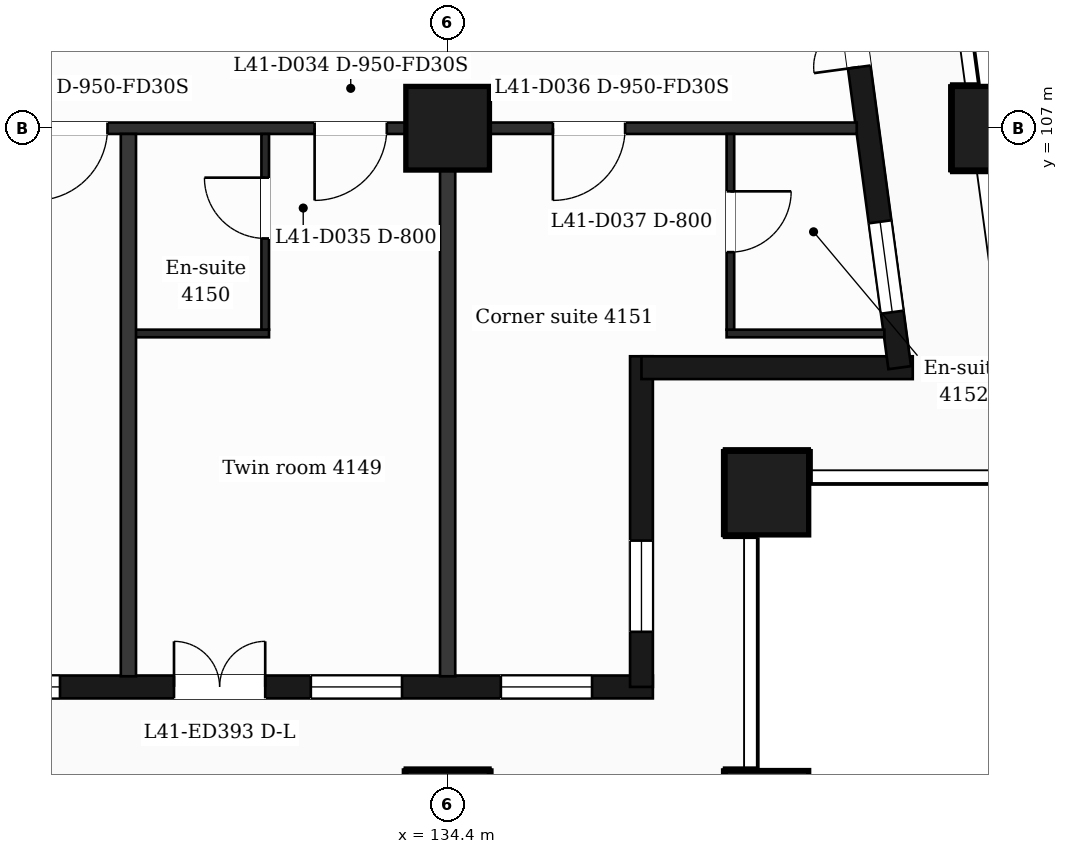
"""IFC4 building model, lengths in metres.
Left out: names, types, materials, properties, quantities, classifications, styles, units other than length and angle.
Written with IfcOpenShell. Run it as: python <this file> out.ifc"""

import sys

from ifc_helpers import new_model, si_unit, direction, frame, frame_2d, origin, origin_2d, place, context, subcontext, project, spatial, rectangle, extrude, element, fill, save


model = new_model("IFC4")
c1 = context("Model", 3, precision=1e-05, world=origin(), true_north=direction((0.0, 1.0)))
c2 = subcontext(c1, "Body", "Model", "MODEL_VIEW")
j1 = project(units=[si_unit("LENGTHUNIT", "METRE"), si_unit("PLANEANGLEUNIT", "RADIAN")], contexts=[c1])
p1 = place(None, origin())
s1 = spatial("IfcSite", under=j1, at=p1, CompositionType="ELEMENT")
p2 = place(p1, origin())
s2 = spatial("IfcBuilding", under=s1, at=p2, CompositionType="ELEMENT")
p3 = place(p2, frame((0.0, 0.0, 173.7)))
s3 = spatial("IfcBuildingStorey", under=s2, at=p3, CompositionType="ELEMENT", Elevation=173.7)
for number, where, z_axis, x_axis in (
    (1, (134.4, 98.0, 0.0), (0.0, 0.0, 1.0), (1.0, 0.0, 0.0)),
    (2, (138.6, 98.0, 0.0), (0.0, 0.0, 1.0), (1.0, 0.0, 0.0)),
    (3, (138.6, 102.2, 0.0), (0.0, 0.0, 1.0), (1.0, 0.0, 0.0)),
    (4, (134.4, 107.0, 0.0), (0.0, 0.0, 1.0), (1.0, 0.0, 0.0)),
    (5, (141.588, 107.0, 0.0), (0.0, 0.0, 1.0), (1.0, 0.0, 0.0)),
):
    element("IfcColumn", number, at=place(p3, frame(where, z_axis=z_axis, x_axis=x_axis)), inside=s3, PredefinedType="COLUMN", context=c2, shape_type="SweptSolid", body=[
        extrude(rectangle(XDim=1.1, YDim=1.1, at=origin_2d()), origin(), (0.0, 0.0, 1.0), 3.7),
    ])
p4 = place(p3, frame((89.85, 99.65, 0.0), z_axis=(0.0, 0.0, 1.0), x_axis=(1.0, 0.0, 0.0)))
e6 = element("IfcWall", 6, at=p4, inside=s3, PredefinedType="SOLIDWALL", context=c2, shape_type="SweptSolid", body=[
    extrude(rectangle(XDim=47.25, YDim=0.3, at=frame_2d((23.625, 0.0))), origin(), (0.0, 0.0, 1.0), 3.38),
])
p5 = place(p4, frame((0.725, 0.0, 0.9)))
e7 = element("IfcOpeningElement", 7, at=p5, cuts=e6, PredefinedType="OPENING", context=c2, shape_type="SweptSolid", body=[
    extrude(rectangle(XDim=1.2, YDim=2.1, at=frame_2d((0.6, 1.05))), frame((0.0, 0.16, 0.0), z_axis=(0.0, -1.0, 0.0), x_axis=(1.0, 0.0, 0.0)), (0.0, 0.0, 1.0), 0.32),
])
p6 = place(p4, frame((3.45, 0.0, 0.9)))
e8 = element("IfcOpeningElement", 8, at=p6, cuts=e6, PredefinedType="OPENING", context=c2, shape_type="SweptSolid", body=[
    extrude(rectangle(XDim=2.4, YDim=2.1, at=frame_2d((1.2, 1.05))), frame((0.0, 0.16, 0.0), z_axis=(0.0, -1.0, 0.0), x_axis=(1.0, 0.0, 0.0)), (0.0, 0.0, 1.0), 0.32),
])
p7 = place(p4, frame((7.65, 0.0, 0.9)))
e9 = element("IfcOpeningElement", 9, at=p7, cuts=e6, PredefinedType="OPENING", context=c2, shape_type="SweptSolid", body=[
    extrude(rectangle(XDim=2.4, YDim=2.1, at=frame_2d((1.2, 1.05))), frame((0.0, 0.16, 0.0), z_axis=(0.0, -1.0, 0.0), x_axis=(1.0, 0.0, 0.0)), (0.0, 0.0, 1.0), 0.32),
])
p8 = place(p4, frame((11.85, 0.0, 0.9)))
e10 = element("IfcOpeningElement", 10, at=p8, cuts=e6, PredefinedType="OPENING", context=c2, shape_type="SweptSolid", body=[
    extrude(rectangle(XDim=2.4, YDim=2.1, at=frame_2d((1.2, 1.05))), frame((0.0, 0.16, 0.0), z_axis=(0.0, -1.0, 0.0), x_axis=(1.0, 0.0, 0.0)), (0.0, 0.0, 1.0), 0.32),
])
p9 = place(p4, frame((16.05, 0.0, 0.9)))
e11 = element("IfcOpeningElement", 11, at=p9, cuts=e6, PredefinedType="OPENING", context=c2, shape_type="SweptSolid", body=[
    extrude(rectangle(XDim=2.4, YDim=2.1, at=frame_2d((1.2, 1.05))), frame((0.0, 0.16, 0.0), z_axis=(0.0, -1.0, 0.0), x_axis=(1.0, 0.0, 0.0)), (0.0, 0.0, 1.0), 0.32),
])
p10 = place(p4, frame((20.25, 0.0, 0.9)))
e12 = element("IfcOpeningElement", 12, at=p10, cuts=e6, PredefinedType="OPENING", context=c2, shape_type="SweptSolid", body=[
    extrude(rectangle(XDim=2.4, YDim=2.1, at=frame_2d((1.2, 1.05))), frame((0.0, 0.16, 0.0), z_axis=(0.0, -1.0, 0.0), x_axis=(1.0, 0.0, 0.0)), (0.0, 0.0, 1.0), 0.32),
])
p11 = place(p4, frame((25.05, 0.0, 0.9)))
e13 = element("IfcOpeningElement", 13, at=p11, cuts=e6, PredefinedType="OPENING", context=c2, shape_type="SweptSolid", body=[
    extrude(rectangle(XDim=1.2, YDim=2.1, at=frame_2d((0.6, 1.05))), frame((0.0, 0.16, 0.0), z_axis=(0.0, -1.0, 0.0), x_axis=(1.0, 0.0, 0.0)), (0.0, 0.0, 1.0), 0.32),
])
p12 = place(p4, frame((29.25, 0.0, 0.9)))
e14 = element("IfcOpeningElement", 14, at=p12, cuts=e6, PredefinedType="OPENING", context=c2, shape_type="SweptSolid", body=[
    extrude(rectangle(XDim=1.2, YDim=2.1, at=frame_2d((0.6, 1.05))), frame((0.0, 0.16, 0.0), z_axis=(0.0, -1.0, 0.0), x_axis=(1.0, 0.0, 0.0)), (0.0, 0.0, 1.0), 0.32),
])
p13 = place(p4, frame((32.55, 0.0, 0.0)))
e15 = element("IfcOpeningElement", 15, at=p13, cuts=e6, PredefinedType="OPENING", context=c2, shape_type="SweptSolid", body=[
    extrude(rectangle(XDim=1.2, YDim=2.4, at=frame_2d((0.6, 1.2))), frame((0.0, 0.16, 0.0), z_axis=(0.0, -1.0, 0.0), x_axis=(1.0, 0.0, 0.0)), (0.0, 0.0, 1.0), 0.32),
])
p14 = place(p4, frame((34.35, 0.0, 0.9)))
e16 = element("IfcOpeningElement", 16, at=p14, cuts=e6, PredefinedType="OPENING", context=c2, shape_type="SweptSolid", body=[
    extrude(rectangle(XDim=1.2, YDim=2.1, at=frame_2d((0.6, 1.05))), frame((0.0, 0.16, 0.0), z_axis=(0.0, -1.0, 0.0), x_axis=(1.0, 0.0, 0.0)), (0.0, 0.0, 1.0), 0.32),
])
p15 = place(p4, frame((37.05, 0.0, 0.9)))
e17 = element("IfcOpeningElement", 17, at=p15, cuts=e6, PredefinedType="OPENING", context=c2, shape_type="SweptSolid", body=[
    extrude(rectangle(XDim=2.4, YDim=2.1, at=frame_2d((1.2, 1.05))), frame((0.0, 0.16, 0.0), z_axis=(0.0, -1.0, 0.0), x_axis=(1.0, 0.0, 0.0)), (0.0, 0.0, 1.0), 0.32),
])
p16 = place(p4, frame((40.95, 0.0, 0.0)))
e18 = element("IfcOpeningElement", 18, at=p16, cuts=e6, PredefinedType="OPENING", context=c2, shape_type="SweptSolid", body=[
    extrude(rectangle(XDim=1.2, YDim=2.4, at=frame_2d((0.6, 1.2))), frame((0.0, 0.16, 0.0), z_axis=(0.0, -1.0, 0.0), x_axis=(1.0, 0.0, 0.0)), (0.0, 0.0, 1.0), 0.32),
])
p17 = place(p4, frame((42.75, 0.0, 0.9)))
e19 = element("IfcOpeningElement", 19, at=p17, cuts=e6, PredefinedType="OPENING", context=c2, shape_type="SweptSolid", body=[
    extrude(rectangle(XDim=1.2, YDim=2.1, at=frame_2d((0.6, 1.05))), frame((0.0, 0.16, 0.0), z_axis=(0.0, -1.0, 0.0), x_axis=(1.0, 0.0, 0.0)), (0.0, 0.0, 1.0), 0.32),
])
p18 = place(p4, frame((45.25, 0.0, 0.9)))
e20 = element("IfcOpeningElement", 20, at=p18, cuts=e6, PredefinedType="OPENING", context=c2, shape_type="SweptSolid", body=[
    extrude(rectangle(XDim=1.2, YDim=2.1, at=frame_2d((0.6, 1.05))), frame((0.0, 0.16, 0.0), z_axis=(0.0, -1.0, 0.0), x_axis=(1.0, 0.0, 0.0)), (0.0, 0.0, 1.0), 0.32),
])
p19 = place(p3, frame((136.95, 99.65, 0.0), z_axis=(0.0, 0.0, 1.0), x_axis=(0.0, 1.0, 0.0)))
e21 = element("IfcWall", 21, at=p19, inside=s3, PredefinedType="SOLIDWALL", context=c2, shape_type="SweptSolid", body=[
    extrude(rectangle(XDim=4.35, YDim=0.3, at=frame_2d((2.175, 0.0))), origin(), (0.0, 0.0, 1.0), 3.38),
])
p20 = place(p19, frame((0.725, 0.0, 0.9)))
e22 = element("IfcOpeningElement", 22, at=p20, cuts=e21, PredefinedType="OPENING", context=c2, shape_type="SweptSolid", body=[
    extrude(rectangle(XDim=1.2, YDim=2.1, at=frame_2d((0.6, 1.05))), frame((0.0, 0.16, 0.0), z_axis=(0.0, -1.0, 0.0), x_axis=(1.0, 0.0, 0.0)), (0.0, 0.0, 1.0), 0.32),
])
p21 = place(p3, frame((136.95, 103.85, 0.0), z_axis=(0.0, 0.0, 1.0), x_axis=(1.0, 0.0, 0.0)))
e23 = element("IfcWall", 23, at=p21, inside=s3, PredefinedType="SOLIDWALL", context=c2, shape_type="SweptSolid", body=[
    extrude(rectangle(XDim=3.569, YDim=0.3, at=frame_2d((1.785, 0.0))), origin(), (0.0, 0.0, 1.0), 3.38),
])
p22 = place(p3, frame((140.348, 103.85, 0.0), z_axis=(0.0, 0.0, 1.0), x_axis=(-0.133431549479, 0.991058031401, 0.0)))
e24 = element("IfcWall", 24, at=p22, inside=s3, PredefinedType="SOLIDWALL", context=c2, shape_type="SweptSolid", body=[
    extrude(rectangle(XDim=6.609, YDim=0.3, at=frame_2d((3.304, 0.0))), origin(), (0.0, 0.0, 1.0), 3.38),
])
p23 = place(p22, frame((0.737, 0.0, 0.9)))
e25 = element("IfcOpeningElement", 25, at=p23, cuts=e24, PredefinedType="OPENING", context=c2, shape_type="SweptSolid", body=[
    extrude(rectangle(XDim=1.2, YDim=2.1, at=frame_2d((0.6, 1.05))), frame((0.0, 0.16, 0.0), z_axis=(0.0, -1.0, 0.0), x_axis=(1.0, 0.0, 0.0)), (0.0, 0.0, 1.0), 0.32),
])
p24 = place(p22, frame((3.991, 0.0, 0.0)))
e26 = element("IfcOpeningElement", 26, at=p24, cuts=e24, PredefinedType="OPENING", context=c2, shape_type="SweptSolid", body=[
    extrude(rectangle(XDim=1.2, YDim=2.4, at=frame_2d((0.6, 1.2))), frame((0.0, 0.16, 0.0), z_axis=(0.0, -1.0, 0.0), x_axis=(1.0, 0.0, 0.0)), (0.0, 0.0, 1.0), 0.32),
])
p25 = place(p3, frame((130.2, 104.3, 0.0), z_axis=(0.0, 0.0, 1.0), x_axis=(1.0, 0.0, 0.0)))
e27 = element("IfcWall", 27, at=p25, inside=s3, PredefinedType="PARTITIONING", context=c2, shape_type="SweptSolid", body=[
    extrude(rectangle(XDim=1.85, YDim=0.1, at=frame_2d((0.925, 0.0))), origin(), (0.0, 0.0, 1.0), 3.38),
])
p26 = place(p3, frame((138.07, 104.3, 0.0), z_axis=(0.0, 0.0, 1.0), x_axis=(1.0, 0.0, 0.0)))
e28 = element("IfcWall", 28, at=p26, inside=s3, PredefinedType="PARTITIONING", context=c2, shape_type="SweptSolid", body=[
    extrude(rectangle(XDim=2.076, YDim=0.1, at=frame_2d((1.038, 0.0))), origin(), (0.0, 0.0, 1.0), 3.38),
])
p27 = place(p3, frame((87.018, 107.0, 0.0), z_axis=(0.0, 0.0, 1.0), x_axis=(1.0, 0.0, 0.0)))
e29 = element("IfcWall", 29, at=p27, inside=s3, PredefinedType="PARTITIONING", context=c2, shape_type="SweptSolid", body=[
    extrude(rectangle(XDim=52.765, YDim=0.15, at=frame_2d((26.382, 0.0))), origin(), (0.0, 0.0, 1.0), 3.38),
])
p28 = place(p27, frame((1.276, 0.0, 0.0)))
e30 = element("IfcOpeningElement", 30, at=p28, cuts=e29, PredefinedType="OPENING", context=c2, shape_type="SweptSolid", body=[
    extrude(rectangle(XDim=0.95, YDim=2.1, at=frame_2d((0.475, 1.05))), frame((0.0, 0.085, 0.0), z_axis=(0.0, -1.0, 0.0), x_axis=(1.0, 0.0, 0.0)), (0.0, 0.0, 1.0), 0.17),
])
p29 = place(p27, frame((8.357, 0.0, 0.0)))
e31 = element("IfcOpeningElement", 31, at=p29, cuts=e29, PredefinedType="OPENING", context=c2, shape_type="SweptSolid", body=[
    extrude(rectangle(XDim=0.95, YDim=2.1, at=frame_2d((0.475, 1.05))), frame((0.0, 0.085, 0.0), z_axis=(0.0, -1.0, 0.0), x_axis=(1.0, 0.0, 0.0)), (0.0, 0.0, 1.0), 0.17),
])
p30 = place(p27, frame((9.832, 0.0, 0.0)))
e32 = element("IfcOpeningElement", 32, at=p30, cuts=e29, PredefinedType="OPENING", context=c2, shape_type="SweptSolid", body=[
    extrude(rectangle(XDim=1.0, YDim=2.1, at=frame_2d((0.5, 1.05))), frame((0.0, 0.085, 0.0), z_axis=(0.0, -1.0, 0.0), x_axis=(1.0, 0.0, 0.0)), (0.0, 0.0, 1.0), 0.17),
])
p31 = place(p27, frame((14.547, 0.0, 0.0)))
e33 = element("IfcOpeningElement", 33, at=p31, cuts=e29, PredefinedType="OPENING", context=c2, shape_type="SweptSolid", body=[
    extrude(rectangle(XDim=0.95, YDim=2.1, at=frame_2d((0.475, 1.05))), frame((0.0, 0.085, 0.0), z_axis=(0.0, -1.0, 0.0), x_axis=(1.0, 0.0, 0.0)), (0.0, 0.0, 1.0), 0.17),
])
p32 = place(p27, frame((18.257, 0.0, 0.0)))
e34 = element("IfcOpeningElement", 34, at=p32, cuts=e29, PredefinedType="OPENING", context=c2, shape_type="SweptSolid", body=[
    extrude(rectangle(XDim=0.95, YDim=2.1, at=frame_2d((0.475, 1.05))), frame((0.0, 0.085, 0.0), z_axis=(0.0, -1.0, 0.0), x_axis=(1.0, 0.0, 0.0)), (0.0, 0.0, 1.0), 0.17),
])
p33 = place(p27, frame((25.212, 0.0, 0.0)))
e35 = element("IfcOpeningElement", 35, at=p33, cuts=e29, PredefinedType="OPENING", context=c2, shape_type="SweptSolid", body=[
    extrude(rectangle(XDim=1.0, YDim=2.1, at=frame_2d((0.5, 1.05))), frame((0.0, 0.085, 0.0), z_axis=(0.0, -1.0, 0.0), x_axis=(1.0, 0.0, 0.0)), (0.0, 0.0, 1.0), 0.17),
])
p34 = place(p27, frame((37.267, 0.0, 0.0)))
e36 = element("IfcOpeningElement", 36, at=p34, cuts=e29, PredefinedType="OPENING", context=c2, shape_type="SweptSolid", body=[
    extrude(rectangle(XDim=0.95, YDim=2.1, at=frame_2d((0.475, 1.05))), frame((0.0, 0.085, 0.0), z_axis=(0.0, -1.0, 0.0), x_axis=(1.0, 0.0, 0.0)), (0.0, 0.0, 1.0), 0.17),
])
p35 = place(p27, frame((41.957, 0.0, 0.0)))
e37 = element("IfcOpeningElement", 37, at=p35, cuts=e29, PredefinedType="OPENING", context=c2, shape_type="SweptSolid", body=[
    extrude(rectangle(XDim=0.95, YDim=2.1, at=frame_2d((0.475, 1.05))), frame((0.0, 0.085, 0.0), z_axis=(0.0, -1.0, 0.0), x_axis=(1.0, 0.0, 0.0)), (0.0, 0.0, 1.0), 0.17),
])
p36 = place(p27, frame((45.632, 0.0, 0.0)))
e38 = element("IfcOpeningElement", 38, at=p36, cuts=e29, PredefinedType="OPENING", context=c2, shape_type="SweptSolid", body=[
    extrude(rectangle(XDim=0.95, YDim=2.1, at=frame_2d((0.475, 1.05))), frame((0.0, 0.085, 0.0), z_axis=(0.0, -1.0, 0.0), x_axis=(1.0, 0.0, 0.0)), (0.0, 0.0, 1.0), 0.17),
])
p37 = place(p27, frame((48.767, 0.0, 0.0)))
e39 = element("IfcOpeningElement", 39, at=p37, cuts=e29, PredefinedType="OPENING", context=c2, shape_type="SweptSolid", body=[
    extrude(rectangle(XDim=0.95, YDim=2.1, at=frame_2d((0.475, 1.05))), frame((0.0, 0.085, 0.0), z_axis=(0.0, -1.0, 0.0), x_axis=(1.0, 0.0, 0.0)), (0.0, 0.0, 1.0), 0.17),
])
p38 = place(p3, frame((130.2, 99.79, 0.0), z_axis=(0.0, 0.0, 1.0), x_axis=(0.0, 1.0, 0.0)))
e40 = element("IfcWall", 40, at=p38, inside=s3, PredefinedType="PARTITIONING", context=c2, shape_type="SweptSolid", body=[
    extrude(rectangle(XDim=7.135, YDim=0.2, at=frame_2d((3.567, 0.0))), origin(), (0.0, 0.0, 1.0), 3.38),
])
p39 = place(p3, frame((132.0, 104.35, 0.0), z_axis=(0.0, 0.0, 1.0), x_axis=(0.0, 1.0, 0.0)))
e41 = element("IfcWall", 41, at=p39, inside=s3, PredefinedType="PARTITIONING", context=c2, shape_type="SweptSolid", body=[
    extrude(rectangle(XDim=2.575, YDim=0.1, at=frame_2d((1.288, 0.0))), origin(), (0.0, 0.0, 1.0), 3.38),
])
p40 = place(p39, frame((1.2, 0.0, 0.0)))
e42 = element("IfcOpeningElement", 42, at=p40, cuts=e41, PredefinedType="OPENING", context=c2, shape_type="SweptSolid", body=[
    extrude(rectangle(XDim=0.8, YDim=2.1, at=frame_2d((0.4, 1.05))), frame((0.0, 0.06, 0.0), z_axis=(0.0, -1.0, 0.0), x_axis=(1.0, 0.0, 0.0)), (0.0, 0.0, 1.0), 0.12),
])
p41 = place(p3, frame((134.4, 99.79, 0.0), z_axis=(0.0, 0.0, 1.0), x_axis=(0.0, 1.0, 0.0)))
e43 = element("IfcWall", 43, at=p41, inside=s3, PredefinedType="PARTITIONING", context=c2, shape_type="SweptSolid", body=[
    extrude(rectangle(XDim=7.135, YDim=0.2, at=frame_2d((3.567, 0.0))), origin(), (0.0, 0.0, 1.0), 3.38),
])
p42 = place(p3, frame((138.12, 104.35, 0.0), z_axis=(0.0, 0.0, 1.0), x_axis=(0.0, 1.0, 0.0)))
e44 = element("IfcWall", 44, at=p42, inside=s3, PredefinedType="PARTITIONING", context=c2, shape_type="SweptSolid", body=[
    extrude(rectangle(XDim=2.575, YDim=0.1, at=frame_2d((1.288, 0.0))), origin(), (0.0, 0.0, 1.0), 3.38),
])
p43 = place(p42, frame((1.02, 0.0, 0.0)))
e45 = element("IfcOpeningElement", 45, at=p43, cuts=e44, PredefinedType="OPENING", context=c2, shape_type="SweptSolid", body=[
    extrude(rectangle(XDim=0.8, YDim=2.1, at=frame_2d((0.4, 1.05))), frame((0.0, 0.06, 0.0), z_axis=(0.0, -1.0, 0.0), x_axis=(1.0, 0.0, 0.0)), (0.0, 0.0, 1.0), 0.12),
])
p44 = place(p15, origin())
e46 = element("IfcWindow", 46, at=p44, inside=s3, PartitioningType="SINGLE_PANEL", PredefinedType="WINDOW", context=c2, shape_type="SweptSolid", body=[
    extrude(rectangle(XDim=2.4, YDim=2.1, at=frame_2d((1.2, 1.05))), frame((0.0, 0.03, 0.0), z_axis=(0.0, -1.0, 0.0), x_axis=(1.0, 0.0, 0.0)), (0.0, 0.0, 1.0), 0.06),
])
fill(e17, e46)
p45 = place(p16, origin())
e47 = element("IfcDoor", 47, at=p45, inside=s3, OperationType="DOUBLE_DOOR_SINGLE_SWING", PredefinedType="DOOR", context=c2, shape_type="SweptSolid", body=[
    extrude(rectangle(XDim=1.2, YDim=2.4, at=frame_2d((0.6, 1.2))), frame((0.0, 0.025, 0.0), z_axis=(0.0, -1.0, 0.0), x_axis=(1.0, 0.0, 0.0)), (0.0, 0.0, 1.0), 0.05),
])
fill(e18, e47)
p46 = place(p17, origin())
e48 = element("IfcWindow", 48, at=p46, inside=s3, PartitioningType="SINGLE_PANEL", PredefinedType="WINDOW", context=c2, shape_type="SweptSolid", body=[
    extrude(rectangle(XDim=1.2, YDim=2.1, at=frame_2d((0.6, 1.05))), frame((0.0, 0.03, 0.0), z_axis=(0.0, -1.0, 0.0), x_axis=(1.0, 0.0, 0.0)), (0.0, 0.0, 1.0), 0.06),
])
fill(e19, e48)
p47 = place(p18, origin())
e49 = element("IfcWindow", 49, at=p47, inside=s3, PartitioningType="SINGLE_PANEL", PredefinedType="WINDOW", context=c2, shape_type="SweptSolid", body=[
    extrude(rectangle(XDim=1.2, YDim=2.1, at=frame_2d((0.6, 1.05))), frame((0.0, 0.03, 0.0), z_axis=(0.0, -1.0, 0.0), x_axis=(1.0, 0.0, 0.0)), (0.0, 0.0, 1.0), 0.06),
])
fill(e20, e49)
p48 = place(p20, origin())
e50 = element("IfcWindow", 50, at=p48, inside=s3, PartitioningType="SINGLE_PANEL", PredefinedType="WINDOW", context=c2, shape_type="SweptSolid", body=[
    extrude(rectangle(XDim=1.2, YDim=2.1, at=frame_2d((0.6, 1.05))), frame((0.0, 0.03, 0.0), z_axis=(0.0, -1.0, 0.0), x_axis=(1.0, 0.0, 0.0)), (0.0, 0.0, 1.0), 0.06),
])
fill(e22, e50)
p49 = place(p23, origin())
e51 = element("IfcWindow", 51, at=p49, inside=s3, PartitioningType="SINGLE_PANEL", PredefinedType="WINDOW", context=c2, shape_type="SweptSolid", body=[
    extrude(rectangle(XDim=1.2, YDim=2.1, at=frame_2d((0.6, 1.05))), frame((0.0, 0.03, 0.0), z_axis=(0.0, -1.0, 0.0), x_axis=(1.0, 0.0, 0.0)), (0.0, 0.0, 1.0), 0.06),
])
fill(e25, e51)
p50 = place(p24, origin())
e52 = element("IfcDoor", 52, at=p50, inside=s3, OperationType="DOUBLE_DOOR_SINGLE_SWING", PredefinedType="DOOR", context=c2, shape_type="SweptSolid", body=[
    extrude(rectangle(XDim=1.2, YDim=2.4, at=frame_2d((0.6, 1.2))), frame((0.0, 0.025, 0.0), z_axis=(0.0, -1.0, 0.0), x_axis=(1.0, 0.0, 0.0)), (0.0, 0.0, 1.0), 0.05),
])
fill(e26, e52)
p51 = place(p35, origin())
e53 = element("IfcDoor", 53, at=p51, inside=s3, OperationType="SINGLE_SWING_LEFT", PredefinedType="DOOR", context=c2, shape_type="SweptSolid", body=[
    extrude(rectangle(XDim=0.95, YDim=2.1, at=frame_2d((0.475, 1.05))), frame((0.0, 0.025, 0.0), z_axis=(0.0, -1.0, 0.0), x_axis=(1.0, 0.0, 0.0)), (0.0, 0.0, 1.0), 0.05),
])
fill(e37, e53)
p52 = place(p36, origin())
e54 = element("IfcDoor", 54, at=p52, inside=s3, OperationType="SINGLE_SWING_LEFT", PredefinedType="DOOR", context=c2, shape_type="SweptSolid", body=[
    extrude(rectangle(XDim=0.95, YDim=2.1, at=frame_2d((0.475, 1.05))), frame((0.0, 0.025, 0.0), z_axis=(0.0, -1.0, 0.0), x_axis=(1.0, 0.0, 0.0)), (0.0, 0.0, 1.0), 0.05),
])
fill(e38, e54)
p53 = place(p40, origin())
e55 = element("IfcDoor", 55, at=p53, inside=s3, OperationType="SINGLE_SWING_RIGHT", PredefinedType="DOOR", context=c2, shape_type="SweptSolid", body=[
    extrude(rectangle(XDim=0.8, YDim=2.1, at=frame_2d((0.4, 1.05))), frame((0.0, 0.025, 0.0), z_axis=(0.0, -1.0, 0.0), x_axis=(1.0, 0.0, 0.0)), (0.0, 0.0, 1.0), 0.05),
])
fill(e42, e55)
p54 = place(p37, origin())
e56 = element("IfcDoor", 56, at=p54, inside=s3, OperationType="SINGLE_SWING_LEFT", PredefinedType="DOOR", context=c2, shape_type="SweptSolid", body=[
    extrude(rectangle(XDim=0.95, YDim=2.1, at=frame_2d((0.475, 1.05))), frame((0.0, 0.025, 0.0), z_axis=(0.0, -1.0, 0.0), x_axis=(1.0, 0.0, 0.0)), (0.0, 0.0, 1.0), 0.05),
])
fill(e39, e56)
p55 = place(p43, origin())
e57 = element("IfcDoor", 57, at=p55, inside=s3, OperationType="SINGLE_SWING_RIGHT", PredefinedType="DOOR", context=c2, shape_type="SweptSolid", body=[
    extrude(rectangle(XDim=0.8, YDim=2.1, at=frame_2d((0.4, 1.05))), frame((0.0, 0.025, 0.0), z_axis=(0.0, -1.0, 0.0), x_axis=(1.0, 0.0, 0.0)), (0.0, 0.0, 1.0), 0.05),
])
fill(e45, e57)
save(model, sys.argv[1])
